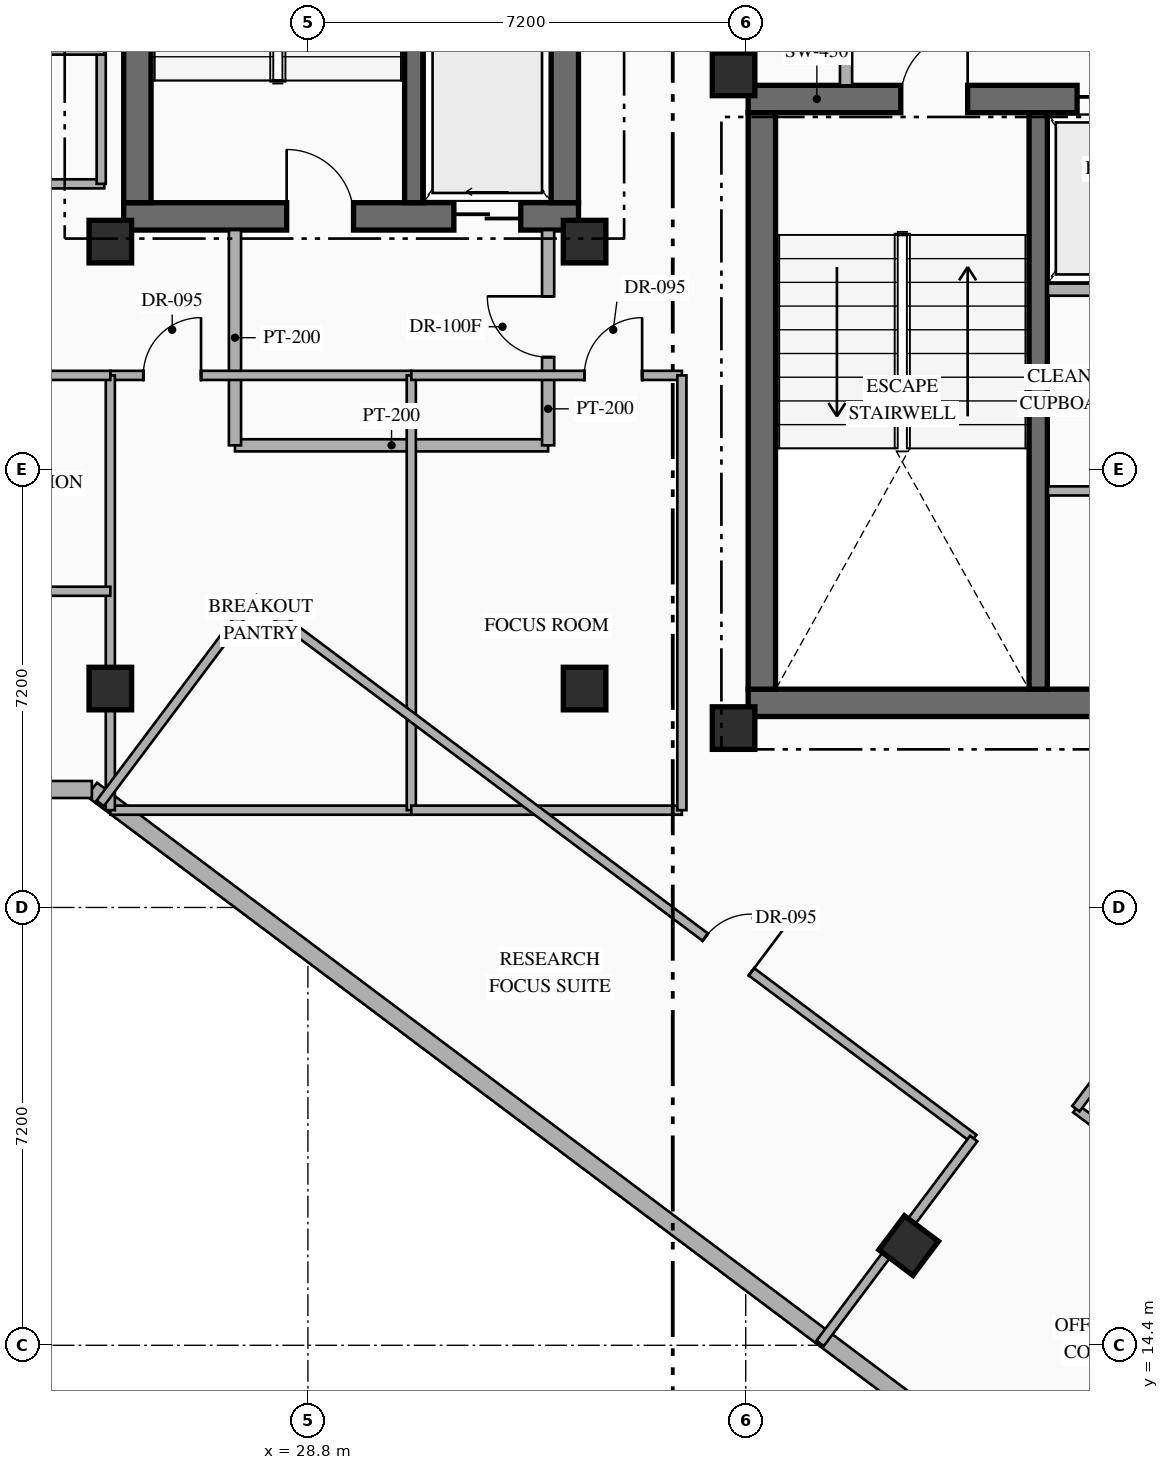
"""IFC4 building model, lengths in metres.
Left out: names, types, materials, properties, quantities, classifications, styles, units other than length and angle.
Written with IfcOpenShell. Run it as: python <this file> out.ifc"""

import sys

from ifc_helpers import new_model, si_unit, direction, frame, frame_2d, origin, origin_2d, place, context, subcontext, project, spatial, rectangle, hollow_rectangle, extrude, element, fill, save


model = new_model("IFC4")
c1 = context("Model", 3, precision=1e-05, world=origin(), true_north=direction((0.0, 1.0)))
c2 = subcontext(c1, "Body", "Model", "MODEL_VIEW")
j1 = project(units=[si_unit("LENGTHUNIT", "METRE"), si_unit("PLANEANGLEUNIT", "RADIAN")], contexts=[c1])
p1 = place(None, origin())
s1 = spatial("IfcSite", under=j1, at=p1, CompositionType="ELEMENT")
p2 = place(p1, origin())
s2 = spatial("IfcBuilding", under=s1, at=p2, CompositionType="ELEMENT")
p3 = place(p2, frame((0.0, 0.0, 223.95)))
s3 = spatial("IfcBuildingStorey", under=s2, at=p3, CompositionType="ELEMENT", Elevation=223.95)
p4 = place(p3, frame((25.77, 32.965, 0.0), z_axis=(0.0, 0.0, 1.0), x_axis=(1.0, 0.0, 0.0)))
e1 = element("IfcWall", 1, at=p4, inside=s3, PredefinedType="SHEAR", context=c2, shape_type="SweptSolid", body=[
    extrude(rectangle(XDim=7.48, YDim=0.45, at=frame_2d((3.74, 0.0))), origin(), (0.0, 0.0, 1.0), 3.6),
])
p5 = place(p4, frame((2.68, 0.0, 0.0)))
e2 = element("IfcOpeningElement", 2, at=p5, cuts=e1, PredefinedType="OPENING", context=c2, shape_type="SweptSolid", body=[
    extrude(rectangle(XDim=1.1, YDim=2.2, at=frame_2d((0.55, 1.1))), frame((0.0, 0.235, 0.0), z_axis=(0.0, -1.0, 0.0), x_axis=(1.0, 0.0, 0.0)), (0.0, 0.0, 1.0), 0.47),
])
p6 = place(p4, frame((5.43, 0.0, 0.0)))
e3 = element("IfcOpeningElement", 3, at=p6, cuts=e1, PredefinedType="OPENING", context=c2, shape_type="SweptSolid", body=[
    extrude(rectangle(XDim=1.1, YDim=2.15, at=frame_2d((0.55, 1.075))), frame((0.0, 0.235, 0.0), z_axis=(0.0, -1.0, 0.0), x_axis=(1.0, 0.0, 0.0)), (0.0, 0.0, 1.0), 0.47),
])
p7 = place(p3, frame((25.995, 33.19, 0.0), z_axis=(0.0, 0.0, 1.0), x_axis=(0.0, 1.0, 0.0)))
e4 = element("IfcWall", 4, at=p7, inside=s3, PredefinedType="SHEAR", context=c2, shape_type="SweptSolid", body=[
    extrude(rectangle(XDim=9.48, YDim=0.45, at=frame_2d((4.74, 0.0))), origin(), (0.0, 0.0, 1.0), 3.6),
])
p8 = place(p3, frame((33.025, 33.19, 0.0), z_axis=(0.0, 0.0, 1.0), x_axis=(0.0, 1.0, 0.0)))
e5 = element("IfcWall", 5, at=p8, inside=s3, PredefinedType="SHEAR", context=c2, shape_type="SweptSolid", body=[
    extrude(rectangle(XDim=9.48, YDim=0.45, at=frame_2d((4.74, 0.0))), origin(), (0.0, 0.0, 1.0), 3.6),
])
p9 = place(p8, frame((4.16, 0.0, 0.0)))
e6 = element("IfcOpeningElement", 6, at=p9, cuts=e5, PredefinedType="OPENING", context=c2, shape_type="SweptSolid", body=[
    extrude(rectangle(XDim=0.85, YDim=2.08, at=frame_2d((0.425, 1.04))), frame((0.0, 0.235, 0.0), z_axis=(0.0, -1.0, 0.0), x_axis=(1.0, 0.0, 0.0)), (0.0, 0.0, 1.0), 0.47),
])
p10 = place(p8, frame((7.36, 0.0, 0.0)))
e7 = element("IfcOpeningElement", 7, at=p10, cuts=e5, PredefinedType="OPENING", context=c2, shape_type="SweptSolid", body=[
    extrude(rectangle(XDim=0.85, YDim=2.08, at=frame_2d((0.425, 1.04))), frame((0.0, 0.235, 0.0), z_axis=(0.0, -1.0, 0.0), x_axis=(1.0, 0.0, 0.0)), (0.0, 0.0, 1.0), 0.47),
])
p11 = place(p3, frame((30.54, 33.19, 0.0), z_axis=(0.0, 0.0, 1.0), x_axis=(0.0, 1.0, 0.0)))
e8 = element("IfcWall", 8, at=p11, inside=s3, PredefinedType="SHEAR", context=c2, shape_type="SweptSolid", body=[
    extrude(rectangle(XDim=9.48, YDim=0.3, at=frame_2d((4.74, 0.0))), origin(), (0.0, 0.0, 1.0), 3.6),
])
p12 = place(p3, frame((36.04, 24.965, 0.0), z_axis=(0.0, 0.0, 1.0), x_axis=(1.0, 0.0, 0.0)))
e9 = element("IfcWall", 9, at=p12, inside=s3, PredefinedType="SHEAR", context=c2, shape_type="SweptSolid", body=[
    extrude(rectangle(XDim=7.46, YDim=0.45, at=frame_2d((3.73, 0.0))), origin(), (0.0, 0.0, 1.0), 3.6),
])
p13 = place(p3, frame((36.04, 34.895, 0.0), z_axis=(0.0, 0.0, 1.0), x_axis=(1.0, 0.0, 0.0)))
e10 = element("IfcWall", 10, at=p13, inside=s3, PredefinedType="SHEAR", context=c2, shape_type="SweptSolid", body=[
    extrude(rectangle(XDim=7.46, YDim=0.45, at=frame_2d((3.73, 0.0))), origin(), (0.0, 0.0, 1.0), 3.6),
])
p14 = place(p13, frame((2.51, 0.0, 0.0)))
e11 = element("IfcOpeningElement", 11, at=p14, cuts=e10, PredefinedType="OPENING", context=c2, shape_type="SweptSolid", body=[
    extrude(rectangle(XDim=1.1, YDim=2.2, at=frame_2d((0.55, 1.1))), frame((0.0, 0.235, 0.0), z_axis=(0.0, -1.0, 0.0), x_axis=(1.0, 0.0, 0.0)), (0.0, 0.0, 1.0), 0.47),
])
p15 = place(p13, frame((5.41, 0.0, 0.0)))
e12 = element("IfcOpeningElement", 12, at=p15, cuts=e10, PredefinedType="OPENING", context=c2, shape_type="SweptSolid", body=[
    extrude(rectangle(XDim=1.12, YDim=2.15, at=frame_2d((0.56, 1.075))), frame((0.0, 0.235, 0.0), z_axis=(0.0, -1.0, 0.0), x_axis=(1.0, 0.0, 0.0)), (0.0, 0.0, 1.0), 0.47),
])
p16 = place(p3, frame((36.265, 25.19, 0.0), z_axis=(0.0, 0.0, 1.0), x_axis=(0.0, 1.0, 0.0)))
e13 = element("IfcWall", 13, at=p16, inside=s3, PredefinedType="SHEAR", context=c2, shape_type="SweptSolid", body=[
    extrude(rectangle(XDim=9.48, YDim=0.45, at=frame_2d((4.74, 0.0))), origin(), (0.0, 0.0, 1.0), 3.6),
])
p17 = place(p3, frame((40.81, 25.19, 0.0), z_axis=(0.0, 0.0, 1.0), x_axis=(0.0, 1.0, 0.0)))
e14 = element("IfcWall", 14, at=p17, inside=s3, PredefinedType="SHEAR", context=c2, shape_type="SweptSolid", body=[
    extrude(rectangle(XDim=9.48, YDim=0.3, at=frame_2d((4.74, 0.0))), origin(), (0.0, 0.0, 1.0), 3.6),
])
for number, where, z_axis, x_axis in (
    (15, (25.55, 32.55, 0.0), (0.0, 0.0, 1.0), (1.0, 0.0, 0.0)),
    (16, (33.35, 32.55, 0.0), (0.0, 0.0, 1.0), (1.0, 0.0, 0.0)),
    (17, (35.8, 24.55, 0.0), (0.0, 0.0, 1.0), (1.0, 0.0, 0.0)),
    (18, (35.8, 35.3, 0.0), (0.0, 0.0, 1.0), (1.0, 0.0, 0.0)),
    (19, (25.55, 25.2, 0.0), (0.0, 0.0, 1.0), (1.0, 0.0, 0.0)),
    (20, (33.35, 25.2, 0.0), (0.0, 0.0, 1.0), (1.0, 0.0, 0.0)),
    (21, (38.68, 16.04, 0.0), (0.0, 0.0, 1.0), (0.8, -0.6, 0.0)),
):
    element("IfcColumn", number, at=place(p3, frame(where, z_axis=z_axis, x_axis=x_axis)), inside=s3, PredefinedType="COLUMN", context=c2, shape_type="SweptSolid", body=[
        extrude(hollow_rectangle(XDim=0.7, YDim=0.7, WallThickness=0.028, at=origin_2d()), origin(), (0.0, 0.0, 1.0), 3.6),
    ])
p18 = place(p3, frame((44.918, 8.787, 0.0), z_axis=(0.0, 0.0, 1.0), x_axis=(-0.800004765927, 0.599993645378, 0.0)))
e22 = element("IfcWall", 22, at=p18, inside=s3, PredefinedType="STANDARD", context=c2, shape_type="SweptSolid", body=[
    extrude(rectangle(XDim=24.588, YDim=0.28, at=frame_2d((12.294, 0.0))), origin(), (0.0, 0.0, 1.0), 3.35),
])
p19 = place(p3, frame((25.247, 23.54, 0.0), z_axis=(0.0, 0.0, 1.0), x_axis=(-1.0, 0.0, 0.0)))
e23 = element("IfcWall", 23, at=p19, inside=s3, PredefinedType="STANDARD", context=c2, shape_type="SweptSolid", body=[
    extrude(rectangle(XDim=4.789, YDim=0.28, at=frame_2d((2.395, 0.0))), origin(), (0.0, 0.0, 1.0), 3.35),
])
p20 = place(p3, frame((40.97, 31.76, 0.0), z_axis=(0.0, 0.0, 1.0), x_axis=(1.0, 0.0, 0.0)))
e24 = element("IfcWall", 24, at=p20, inside=s3, PredefinedType="STANDARD", context=c2, shape_type="SweptSolid", body=[
    extrude(rectangle(XDim=2.08, YDim=0.2, at=frame_2d((1.04, 0.0))), origin(), (0.0, 0.0, 1.0), 3.35),
])
p21 = place(p3, frame((40.97, 28.45, 0.0), z_axis=(0.0, 0.0, 1.0), x_axis=(1.0, 0.0, 0.0)))
e25 = element("IfcWall", 25, at=p21, inside=s3, PredefinedType="PARTITIONING", context=c2, shape_type="SweptSolid", body=[
    extrude(rectangle(XDim=2.08, YDim=0.15, at=frame_2d((1.04, 0.0))), origin(), (0.0, 0.0, 1.0), 3.35),
])
p22 = place(p3, frame((27.6, 29.2, 0.0), z_axis=(0.0, 0.0, 1.0), x_axis=(1.0, 0.0, 0.0)))
e26 = element("IfcWall", 26, at=p22, inside=s3, PredefinedType="STANDARD", context=c2, shape_type="SweptSolid", body=[
    extrude(rectangle(XDim=5.15, YDim=0.2, at=frame_2d((2.575, 0.0))), origin(), (0.0, 0.0, 1.0), 3.35),
])
p23 = place(p3, frame((27.6, 29.2, 0.0), z_axis=(0.0, 0.0, 1.0), x_axis=(0.0, 1.0, 0.0)))
e27 = element("IfcWall", 27, at=p23, inside=s3, PredefinedType="STANDARD", context=c2, shape_type="SweptSolid", body=[
    extrude(rectangle(XDim=3.54, YDim=0.2, at=frame_2d((1.77, 0.0))), origin(), (0.0, 0.0, 1.0), 3.35),
])
p24 = place(p3, frame((32.75, 29.2, 0.0), z_axis=(0.0, 0.0, 1.0), x_axis=(0.0, 1.0, 0.0)))
e28 = element("IfcWall", 28, at=p24, inside=s3, PredefinedType="STANDARD", context=c2, shape_type="SweptSolid", body=[
    extrude(rectangle(XDim=3.54, YDim=0.2, at=frame_2d((1.77, 0.0))), origin(), (0.0, 0.0, 1.0), 3.35),
])
p25 = place(p24, frame((1.45, 0.0, 0.0)))
e29 = element("IfcOpeningElement", 29, at=p25, cuts=e28, PredefinedType="OPENING", context=c2, shape_type="SweptSolid", body=[
    extrude(rectangle(XDim=1.0, YDim=2.2, at=frame_2d((0.5, 1.1))), frame((0.0, 0.11, 0.0), z_axis=(0.0, -1.0, 0.0), x_axis=(1.0, 0.0, 0.0)), (0.0, 0.0, 1.0), 0.22),
])
p26 = place(p3, frame((37.65, 35.12, 0.0), z_axis=(0.0, 0.0, 1.0), x_axis=(0.0, 1.0, 0.0)))
e30 = element("IfcWall", 30, at=p26, inside=s3, PredefinedType="STANDARD", context=c2, shape_type="SweptSolid", body=[
    extrude(rectangle(XDim=2.98, YDim=0.2, at=frame_2d((1.49, 0.0))), origin(), (0.0, 0.0, 1.0), 3.35),
])
p27 = place(p26, frame((0.99, 0.0, 0.0)))
e31 = element("IfcOpeningElement", 31, at=p27, cuts=e30, PredefinedType="OPENING", context=c2, shape_type="SweptSolid", body=[
    extrude(rectangle(XDim=1.0, YDim=2.2, at=frame_2d((0.5, 1.1))), frame((0.0, 0.11, 0.0), z_axis=(0.0, -1.0, 0.0), x_axis=(1.0, 0.0, 0.0)), (0.0, 0.0, 1.0), 0.22),
])
p28 = place(p3, frame((22.15, 33.5, 0.0), z_axis=(0.0, 0.0, 1.0), x_axis=(1.0, 0.0, 0.0)))
e32 = element("IfcWall", 32, at=p28, inside=s3, PredefinedType="PARTITIONING", context=c2, shape_type="SweptSolid", body=[
    extrude(rectangle(XDim=3.3, YDim=0.15, at=frame_2d((1.65, 0.0))), origin(), (0.0, 0.0, 1.0), 3.35),
])
p29 = place(p3, frame((25.4, 33.5, 0.0), z_axis=(0.0, 0.0, 1.0), x_axis=(0.0, 1.0, 0.0)))
e33 = element("IfcWall", 33, at=p29, inside=s3, PredefinedType="PARTITIONING", context=c2, shape_type="SweptSolid", body=[
    extrude(rectangle(XDim=6.6, YDim=0.15, at=frame_2d((3.3, 0.0))), origin(), (0.0, 0.0, 1.0), 3.35),
])
p30 = place(p3, frame((22.15, 35.7, 0.0), z_axis=(0.0, 0.0, 1.0), x_axis=(1.0, 0.0, 0.0)))
e34 = element("IfcWall", 34, at=p30, inside=s3, PredefinedType="PARTITIONING", context=c2, shape_type="SweptSolid", body=[
    extrude(rectangle(XDim=3.3, YDim=0.15, at=frame_2d((1.65, 0.0))), origin(), (0.0, 0.0, 1.0), 3.35),
])
p31 = place(p3, frame((25.55, 23.2, 0.0), z_axis=(0.0, 0.0, 1.0), x_axis=(1.0, 0.0, 0.0)))
e35 = element("IfcWall", 35, at=p31, inside=s3, PredefinedType="PARTITIONING", context=c2, shape_type="SweptSolid", body=[
    extrude(rectangle(XDim=4.95, YDim=0.15, at=frame_2d((2.475, 0.0))), origin(), (0.0, 0.0, 1.0), 3.35),
])
p32 = place(p3, frame((25.55, 30.35, 0.0), z_axis=(0.0, 0.0, 1.0), x_axis=(1.0, 0.0, 0.0)))
e36 = element("IfcWall", 36, at=p32, inside=s3, PredefinedType="PARTITIONING", context=c2, shape_type="SweptSolid", body=[
    extrude(rectangle(XDim=4.95, YDim=0.15, at=frame_2d((2.475, 0.0))), origin(), (0.0, 0.0, 1.0), 3.35),
])
p33 = place(p32, frame((0.542, 0.0, 0.0)))
e37 = element("IfcOpeningElement", 37, at=p33, cuts=e36, PredefinedType="OPENING", context=c2, shape_type="SweptSolid", body=[
    extrude(rectangle(XDim=0.95, YDim=2.15, at=frame_2d((0.475, 1.075))), frame((0.0, 0.085, 0.0), z_axis=(0.0, -1.0, 0.0), x_axis=(1.0, 0.0, 0.0)), (0.0, 0.0, 1.0), 0.17),
])
p34 = place(p3, frame((25.55, 23.2, 0.0), z_axis=(0.0, 0.0, 1.0), x_axis=(0.0, 1.0, 0.0)))
e38 = element("IfcWall", 38, at=p34, inside=s3, PredefinedType="PARTITIONING", context=c2, shape_type="SweptSolid", body=[
    extrude(rectangle(XDim=7.15, YDim=0.15, at=frame_2d((3.575, 0.0))), origin(), (0.0, 0.0, 1.0), 2.757),
])
p35 = place(p3, frame((30.5, 23.2, 0.0), z_axis=(0.0, 0.0, 1.0), x_axis=(0.0, 1.0, 0.0)))
e39 = element("IfcWall", 39, at=p35, inside=s3, PredefinedType="PARTITIONING", context=c2, shape_type="SweptSolid", body=[
    extrude(rectangle(XDim=7.15, YDim=0.15, at=frame_2d((3.575, 0.0))), origin(), (0.0, 0.0, 1.0), 3.35),
])
p36 = place(p3, frame((30.5, 23.2, 0.0), z_axis=(0.0, 0.0, 1.0), x_axis=(1.0, 0.0, 0.0)))
e40 = element("IfcWall", 40, at=p36, inside=s3, PredefinedType="PARTITIONING", context=c2, shape_type="SweptSolid", body=[
    extrude(rectangle(XDim=4.45, YDim=0.15, at=frame_2d((2.225, 0.0))), origin(), (0.0, 0.0, 1.0), 3.35),
])
p37 = place(p3, frame((30.5, 30.35, 0.0), z_axis=(0.0, 0.0, 1.0), x_axis=(1.0, 0.0, 0.0)))
e41 = element("IfcWall", 41, at=p37, inside=s3, PredefinedType="PARTITIONING", context=c2, shape_type="SweptSolid", body=[
    extrude(rectangle(XDim=4.45, YDim=0.15, at=frame_2d((2.225, 0.0))), origin(), (0.0, 0.0, 1.0), 3.35),
])
p38 = place(p37, frame((2.846, 0.0, 0.0)))
e42 = element("IfcOpeningElement", 42, at=p38, cuts=e41, PredefinedType="OPENING", context=c2, shape_type="SweptSolid", body=[
    extrude(rectangle(XDim=0.95, YDim=2.15, at=frame_2d((0.475, 1.075))), frame((0.0, 0.085, 0.0), z_axis=(0.0, -1.0, 0.0), x_axis=(1.0, 0.0, 0.0)), (0.0, 0.0, 1.0), 0.17),
])
p39 = place(p3, frame((34.95, 23.2, 0.0), z_axis=(0.0, 0.0, 1.0), x_axis=(0.0, 1.0, 0.0)))
e43 = element("IfcWall", 43, at=p39, inside=s3, PredefinedType="PARTITIONING", context=c2, shape_type="SweptSolid", body=[
    extrude(rectangle(XDim=7.15, YDim=0.15, at=frame_2d((3.575, 0.0))), origin(), (0.0, 0.0, 1.0), 3.35),
])
p40 = place(p3, frame((41.43, 18.29, 0.0), z_axis=(0.0, 0.0, 1.0), x_axis=(0.799994629375, -0.600007160767, 0.0)))
e44 = element("IfcWall", 44, at=p40, inside=s3, PredefinedType="PARTITIONING", context=c2, shape_type="SweptSolid", body=[
    extrude(rectangle(XDim=10.91, YDim=0.15, at=frame_2d((5.455, 0.0))), origin(), (0.0, 0.0, 1.0), 3.35),
])
p41 = place(p3, frame((41.43, 18.29, 0.0), z_axis=(0.0, 0.0, 1.0), x_axis=(0.6, 0.8, 0.0)))
e45 = element("IfcWall", 45, at=p41, inside=s3, PredefinedType="PARTITIONING", context=c2, shape_type="SweptSolid", body=[
    extrude(rectangle(XDim=3.75, YDim=0.15, at=frame_2d((1.875, 0.0))), origin(), (0.0, 0.0, 1.0), 3.35),
])
p42 = place(p41, frame((1.4, 0.0, 0.0)))
e46 = element("IfcOpeningElement", 46, at=p42, cuts=e45, PredefinedType="OPENING", context=c2, shape_type="SweptSolid", body=[
    extrude(rectangle(XDim=0.95, YDim=2.15, at=frame_2d((0.475, 1.075))), frame((0.0, 0.085, 0.0), z_axis=(0.0, -1.0, 0.0), x_axis=(1.0, 0.0, 0.0)), (0.0, 0.0, 1.0), 0.17),
])
p43 = place(p3, frame((22.25, 26.8, 0.0), z_axis=(0.0, 0.0, 1.0), x_axis=(1.0, 0.0, 0.0)))
e47 = element("IfcWall", 47, at=p43, inside=s3, PredefinedType="PARTITIONING", context=c2, shape_type="SweptSolid", body=[
    extrude(rectangle(XDim=3.3, YDim=0.15, at=frame_2d((1.65, 0.0))), origin(), (0.0, 0.0, 1.0), 3.35),
])
p44 = place(p3, frame((22.25, 30.35, 0.0), z_axis=(0.0, 0.0, 1.0), x_axis=(1.0, 0.0, 0.0)))
e48 = element("IfcWall", 48, at=p44, inside=s3, PredefinedType="PARTITIONING", context=c2, shape_type="SweptSolid", body=[
    extrude(rectangle(XDim=3.3, YDim=0.15, at=frame_2d((1.65, 0.0))), origin(), (0.0, 0.0, 1.0), 3.35),
])
p45 = place(p44, frame((1.2, 0.0, 0.0)))
e49 = element("IfcOpeningElement", 49, at=p45, cuts=e48, PredefinedType="OPENING", context=c2, shape_type="SweptSolid", body=[
    extrude(rectangle(XDim=0.9, YDim=2.15, at=frame_2d((0.45, 1.075))), frame((0.0, 0.085, 0.0), z_axis=(0.0, -1.0, 0.0), x_axis=(1.0, 0.0, 0.0)), (0.0, 0.0, 1.0), 0.17),
])
p46 = place(p3, frame((27.91, 26.68, 0.0), z_axis=(0.0, 0.0, 1.0), x_axis=(0.800005938517, -0.599992081896, 0.0)))
e50 = element("IfcWall", 50, at=p46, inside=s3, PredefinedType="PARTITIONING", context=c2, shape_type="SweptSolid", body=[
    extrude(rectangle(XDim=14.8, YDim=0.15, at=frame_2d((7.4, 0.0))), origin(), (0.0, 0.0, 1.0), 3.35),
])
p47 = place(p46, frame((9.281, 0.0, 0.0)))
e51 = element("IfcOpeningElement", 51, at=p47, cuts=e50, PredefinedType="OPENING", context=c2, shape_type="SweptSolid", body=[
    extrude(rectangle(XDim=0.95, YDim=2.15, at=frame_2d((0.475, 1.075))), frame((0.0, 0.085, 0.0), z_axis=(0.0, -1.0, 0.0), x_axis=(1.0, 0.0, 0.0)), (0.0, 0.0, 1.0), 0.17),
])
p48 = place(p3, frame((25.384, 23.312, 0.0), z_axis=(0.0, 0.0, 1.0), x_axis=(0.599990721155, 0.80000695905, 0.0)))
e52 = element("IfcWall", 52, at=p48, inside=s3, PredefinedType="PARTITIONING", context=c2, shape_type="SweptSolid", body=[
    extrude(rectangle(XDim=4.21, YDim=0.15, at=frame_2d((2.105, 0.0))), origin(), (0.0, 0.0, 1.0), 3.35),
])
p49 = place(p3, frame((37.224, 14.432, 0.0), z_axis=(0.0, 0.0, 1.0), x_axis=(0.599962885857, 0.800027834262, 0.0)))
e53 = element("IfcWall", 53, at=p49, inside=s3, PredefinedType="PARTITIONING", context=c2, shape_type="SweptSolid", body=[
    extrude(rectangle(XDim=4.21, YDim=0.15, at=frame_2d((2.105, 0.0))), origin(), (0.0, 0.0, 1.0), 2.757),
])
p50 = place(p5, origin())
e54 = element("IfcDoor", 54, at=p50, inside=s3, OperationType="SINGLE_SWING_LEFT", PredefinedType="DOOR", context=c2, shape_type="SweptSolid", body=[
    extrude(rectangle(XDim=1.1, YDim=2.2, at=frame_2d((0.55, 1.1))), frame((0.0, 0.025, 0.0), z_axis=(0.0, -1.0, 0.0), x_axis=(1.0, 0.0, 0.0)), (0.0, 0.0, 1.0), 0.05),
])
fill(e2, e54)
p51 = place(p6, origin())
e55 = element("IfcDoor", 55, at=p51, inside=s3, OperationType="SLIDING_TO_LEFT", PredefinedType="USERDEFINED", context=c2, shape_type="SweptSolid", body=[
    extrude(rectangle(XDim=1.1, YDim=2.15, at=frame_2d((0.55, 1.075))), frame((0.0, 0.025, 0.0), z_axis=(0.0, -1.0, 0.0), x_axis=(1.0, 0.0, 0.0)), (0.0, 0.0, 1.0), 0.05),
])
fill(e3, e55)
p52 = place(p14, origin())
e56 = element("IfcDoor", 56, at=p52, inside=s3, OperationType="SINGLE_SWING_RIGHT", PredefinedType="DOOR", context=c2, shape_type="SweptSolid", body=[
    extrude(rectangle(XDim=1.1, YDim=2.2, at=frame_2d((0.55, 1.1))), frame((0.0, 0.025, 0.0), z_axis=(0.0, -1.0, 0.0), x_axis=(1.0, 0.0, 0.0)), (0.0, 0.0, 1.0), 0.05),
])
fill(e11, e56)
p53 = place(p15, origin())
e57 = element("IfcDoor", 57, at=p53, inside=s3, OperationType="SLIDING_TO_RIGHT", PredefinedType="USERDEFINED", context=c2, shape_type="SweptSolid", body=[
    extrude(rectangle(XDim=1.12, YDim=2.15, at=frame_2d((0.56, 1.075))), frame((0.0, 0.025, 0.0), z_axis=(0.0, -1.0, 0.0), x_axis=(1.0, 0.0, 0.0)), (0.0, 0.0, 1.0), 0.05),
])
fill(e12, e57)
p54 = place(p25, origin())
e58 = element("IfcDoor", 58, at=p54, inside=s3, OperationType="SINGLE_SWING_RIGHT", PredefinedType="DOOR", context=c2, shape_type="SweptSolid", body=[
    extrude(rectangle(XDim=1.0, YDim=2.2, at=frame_2d((0.5, 1.1))), frame((0.0, 0.025, 0.0), z_axis=(0.0, -1.0, 0.0), x_axis=(1.0, 0.0, 0.0)), (0.0, 0.0, 1.0), 0.05),
])
fill(e29, e58)
p55 = place(p33, origin())
e59 = element("IfcDoor", 59, at=p55, inside=s3, OperationType="SINGLE_SWING_RIGHT", PredefinedType="DOOR", context=c2, shape_type="SweptSolid", body=[
    extrude(rectangle(XDim=0.95, YDim=2.15, at=frame_2d((0.475, 1.075))), frame((0.0, 0.025, 0.0), z_axis=(0.0, -1.0, 0.0), x_axis=(1.0, 0.0, 0.0)), (0.0, 0.0, 1.0), 0.05),
])
fill(e37, e59)
p56 = place(p38, origin())
e60 = element("IfcDoor", 60, at=p56, inside=s3, OperationType="SINGLE_SWING_RIGHT", PredefinedType="DOOR", context=c2, shape_type="SweptSolid", body=[
    extrude(rectangle(XDim=0.95, YDim=2.15, at=frame_2d((0.475, 1.075))), frame((0.0, 0.025, 0.0), z_axis=(0.0, -1.0, 0.0), x_axis=(1.0, 0.0, 0.0)), (0.0, 0.0, 1.0), 0.05),
])
fill(e42, e60)
p57 = place(p47, origin())
e61 = element("IfcDoor", 61, at=p57, inside=s3, OperationType="SINGLE_SWING_RIGHT", PredefinedType="DOOR", context=c2, shape_type="SweptSolid", body=[
    extrude(rectangle(XDim=0.95, YDim=2.15, at=frame_2d((0.475, 1.075))), frame((0.0, 0.025, 0.0), z_axis=(0.0, -1.0, 0.0), x_axis=(1.0, 0.0, 0.0)), (0.0, 0.0, 1.0), 0.05),
])
fill(e51, e61)
save(model, sys.argv[1])
